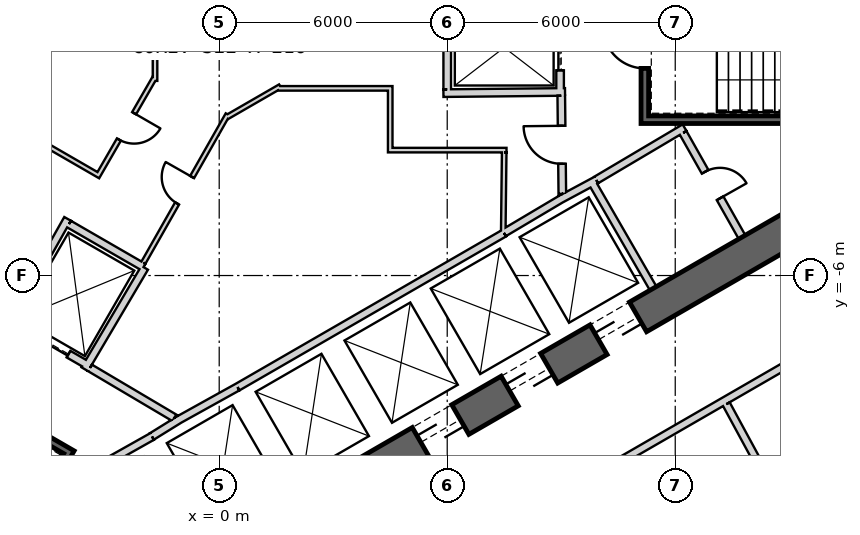
"""IFC4 building model, lengths in metres.
Left out: names, types, materials, properties, quantities, classifications, styles, units other than length and angle.
Written with IfcOpenShell. Run it as: python <this file> out.ifc"""

import sys

from ifc_helpers import new_model, si_unit, direction, frame, frame_2d, origin, place, context, subcontext, project, spatial, rectangle, extrude, element, fill, save


model = new_model("IFC4")
c1 = context("Model", 3, precision=1e-05, world=origin(), true_north=direction((0.0, 1.0)))
c2 = subcontext(c1, "Body", "Model", "MODEL_VIEW")
j1 = project(units=[si_unit("LENGTHUNIT", "METRE"), si_unit("PLANEANGLEUNIT", "RADIAN")], contexts=[c1])
p1 = place(None, origin())
s1 = spatial("IfcSite", under=j1, at=p1, CompositionType="ELEMENT")
p2 = place(p1, origin())
s2 = spatial("IfcBuilding", under=s1, at=p2, CompositionType="ELEMENT")
p3 = place(p2, frame((0.0, 0.0, 119.3)))
s3 = spatial("IfcBuildingStorey", under=s2, at=p3, CompositionType="ELEMENT", Elevation=119.3)
p4 = place(p3, frame((-7.825, -17.97, 0.0), z_axis=(0.0, 0.0, 1.0), x_axis=(0.866028369851, 0.499994862586, 0.0)))
e1 = element("IfcWall", 1, at=p4, inside=s3, PredefinedType="SHEAR", context=c2, shape_type="SweptSolid", body=[
    extrude(rectangle(XDim=31.523, YDim=0.9, at=frame_2d((15.762, 0.0))), origin(), (0.0, 0.0, 1.0), 4.1),
])
p5 = place(p4, frame((7.062, 0.0, 0.0)))
e2 = element("IfcOpeningElement", 2, at=p5, cuts=e1, PredefinedType="OPENING", context=c2, shape_type="SweptSolid", body=[
    extrude(rectangle(XDim=1.2, YDim=2.4, at=frame_2d((0.6, 1.2))), frame((0.0, 0.46, 0.0), z_axis=(0.0, -1.0, 0.0), x_axis=(1.0, 0.0, 0.0)), (0.0, 0.0, 1.0), 0.92),
])
p6 = place(p4, frame((9.762, 0.0, 0.0)))
e3 = element("IfcOpeningElement", 3, at=p6, cuts=e1, PredefinedType="OPENING", context=c2, shape_type="SweptSolid", body=[
    extrude(rectangle(XDim=1.2, YDim=2.4, at=frame_2d((0.6, 1.2))), frame((0.0, 0.46, 0.0), z_axis=(0.0, -1.0, 0.0), x_axis=(1.0, 0.0, 0.0)), (0.0, 0.0, 1.0), 0.92),
])
p7 = place(p4, frame((12.462, 0.0, 0.0)))
e4 = element("IfcOpeningElement", 4, at=p7, cuts=e1, PredefinedType="OPENING", context=c2, shape_type="SweptSolid", body=[
    extrude(rectangle(XDim=1.2, YDim=2.4, at=frame_2d((0.6, 1.2))), frame((0.0, 0.46, 0.0), z_axis=(0.0, -1.0, 0.0), x_axis=(1.0, 0.0, 0.0)), (0.0, 0.0, 1.0), 0.92),
])
p8 = place(p4, frame((15.162, 0.0, 0.0)))
e5 = element("IfcOpeningElement", 5, at=p8, cuts=e1, PredefinedType="OPENING", context=c2, shape_type="SweptSolid", body=[
    extrude(rectangle(XDim=1.2, YDim=2.4, at=frame_2d((0.6, 1.2))), frame((0.0, 0.46, 0.0), z_axis=(0.0, -1.0, 0.0), x_axis=(1.0, 0.0, 0.0)), (0.0, 0.0, 1.0), 0.92),
])
p9 = place(p4, frame((17.862, 0.0, 0.0)))
e6 = element("IfcOpeningElement", 6, at=p9, cuts=e1, PredefinedType="OPENING", context=c2, shape_type="SweptSolid", body=[
    extrude(rectangle(XDim=1.2, YDim=2.4, at=frame_2d((0.6, 1.2))), frame((0.0, 0.46, 0.0), z_axis=(0.0, -1.0, 0.0), x_axis=(1.0, 0.0, 0.0)), (0.0, 0.0, 1.0), 0.92),
])
p10 = place(p4, frame((20.562, 0.0, 0.0)))
e7 = element("IfcOpeningElement", 7, at=p10, cuts=e1, PredefinedType="OPENING", context=c2, shape_type="SweptSolid", body=[
    extrude(rectangle(XDim=1.2, YDim=2.4, at=frame_2d((0.6, 1.2))), frame((0.0, 0.46, 0.0), z_axis=(0.0, -1.0, 0.0), x_axis=(1.0, 0.0, 0.0)), (0.0, 0.0, 1.0), 0.92),
])
p11 = place(p4, frame((26.712, 0.0, 0.0)))
e8 = element("IfcOpeningElement", 8, at=p11, cuts=e1, PredefinedType="OPENING", context=c2, shape_type="SweptSolid", body=[
    extrude(rectangle(XDim=1.2, YDim=2.4, at=frame_2d((0.6, 1.2))), frame((0.0, 0.46, 0.0), z_axis=(0.0, -1.0, 0.0), x_axis=(1.0, 0.0, 0.0)), (0.0, 0.0, 1.0), 0.92),
])
p12 = place(p4, frame((3.612, 0.0, 0.0)))
e9 = element("IfcOpeningElement", 9, at=p12, cuts=e1, PredefinedType="OPENING", context=c2, shape_type="SweptSolid", body=[
    extrude(rectangle(XDim=1.2, YDim=2.4, at=frame_2d((0.6, 1.2))), frame((0.0, 0.46, 0.0), z_axis=(0.0, -1.0, 0.0), x_axis=(1.0, 0.0, 0.0)), (0.0, 0.0, 1.0), 0.92),
])
p13 = place(p3, frame((0.483, -8.936, 0.0), z_axis=(0.0, 0.0, 1.0), x_axis=(0.866030989016, 0.499990325971, 0.0)))
e10 = element("IfcWall", 10, at=p13, inside=s3, PredefinedType="PLUMBINGWALL", context=c2, shape_type="SweptSolid", body=[
    extrude(rectangle(XDim=8.1, YDim=0.2, at=frame_2d((4.05, 0.0))), origin(), (0.0, 0.0, 1.0), 3.8),
])
p14 = place(p3, frame((9.795, -3.525, 0.0), z_axis=(0.0, 0.0, 1.0), x_axis=(0.499984717929, -0.866034226713, 0.0)))
e11 = element("IfcWall", 11, at=p14, inside=s3, PredefinedType="PLUMBINGWALL", context=c2, shape_type="SweptSolid", body=[
    extrude(rectangle(XDim=3.25, YDim=0.2, at=frame_2d((1.625, 0.0))), origin(), (0.0, 0.0, 1.0), 3.8),
])
p15 = place(p3, frame((8.974, -3.999, 0.0), z_axis=(0.0, 0.0, 1.0), x_axis=(0.880907015104, 0.473289373154, 0.0)))
e12 = element("IfcWall", 12, at=p15, inside=s3, PredefinedType="PLUMBINGWALL", context=c2, shape_type="SweptSolid", body=[
    extrude(rectangle(XDim=1.078, YDim=0.2, at=frame_2d((0.539, 0.0))), origin(), (0.0, 0.0, 1.0), 3.8),
])
p16 = place(p3, frame((7.493, -4.878, 0.0), z_axis=(0.0, 0.0, 1.0), x_axis=(0.859981807212, 0.510324691999, 0.0)))
e13 = element("IfcWall", 13, at=p16, inside=s3, PredefinedType="PLUMBINGWALL", context=c2, shape_type="SweptSolid", body=[
    extrude(rectangle(XDim=1.845, YDim=0.2, at=frame_2d((0.922, 0.0))), origin(), (0.0, 0.0, 1.0), 3.8),
])
p17 = place(p3, frame((-1.769, -10.237, 0.0), z_axis=(0.0, 0.0, 1.0), x_axis=(-0.871534483978, -0.490334215854, 0.0)))
e14 = element("IfcWall", 14, at=p17, inside=s3, PredefinedType="PLUMBINGWALL", context=c2, shape_type="SweptSolid", body=[
    extrude(rectangle(XDim=2.7, YDim=0.2, at=frame_2d((1.35, 0.0))), origin(), (0.0, 0.0, 1.0), 3.8),
])
p18 = place(p3, frame((-1.024, -9.771, 0.0), z_axis=(0.0, 0.0, 1.0), x_axis=(-0.850348075135, -0.526220629693, 0.0)))
e15 = element("IfcWall", 15, at=p18, inside=s3, PredefinedType="PLUMBINGWALL", context=c2, shape_type="SweptSolid", body=[
    extrude(rectangle(XDim=0.878, YDim=0.2, at=frame_2d((0.439, 0.0))), origin(), (0.0, 0.0, 1.0), 3.8),
])
p19 = place(p3, frame((-1.13, -9.831, 0.0), z_axis=(0.0, 0.0, 1.0), x_axis=(0.874269620932, 0.485440655401, 0.0)))
e16 = element("IfcWall", 16, at=p19, inside=s3, PredefinedType="PLUMBINGWALL", context=c2, shape_type="SweptSolid", body=[
    extrude(rectangle(XDim=1.845, YDim=0.2, at=frame_2d((0.922, 0.0))), origin(), (0.0, 0.0, 1.0), 3.8),
])
p20 = place(p3, frame((11.1, -1.9, -0.3), z_axis=(0.0, 0.0, 1.0), x_axis=(1.0, 0.0, 0.0)))
e17 = element("IfcWall", 17, at=p20, inside=s3, PredefinedType="SHEAR", context=c2, shape_type="SweptSolid", body=[
    extrude(rectangle(XDim=7.9, YDim=0.2, at=frame_2d((3.95, 0.0))), origin(), (0.0, 0.0, 1.0), 4.1),
])
p21 = place(p3, frame((11.2, -1.8, -0.3), z_axis=(0.0, 0.0, 1.0), x_axis=(0.0, 1.0, 0.0)))
e18 = element("IfcWall", 18, at=p21, inside=s3, PredefinedType="SHEAR", context=c2, shape_type="SweptSolid", body=[
    extrude(rectangle(XDim=3.6, YDim=0.2, at=frame_2d((1.8, 0.0))), origin(), (0.0, 0.0, 1.0), 4.1),
])
p22 = place(p21, frame((1.25, 0.0, 0.3)))
e19 = element("IfcOpeningElement", 19, at=p22, cuts=e18, PredefinedType="OPENING", context=c2, shape_type="SweptSolid", body=[
    extrude(rectangle(XDim=1.1, YDim=2.1, at=frame_2d((0.55, 1.05))), frame((0.0, 0.11, 0.0), z_axis=(0.0, -1.0, 0.0), x_axis=(1.0, 0.0, 0.0)), (0.0, 0.0, 1.0), 0.22),
])
p23 = place(p3, frame((8.97, 1.2, 0.0), z_axis=(0.0, 0.0, 1.0), x_axis=(0.0, -1.0, 0.0)))
e20 = element("IfcWall", 20, at=p23, inside=s3, PredefinedType="PLUMBINGWALL", context=c2, shape_type="SweptSolid", body=[
    extrude(rectangle(XDim=2.4, YDim=0.2, at=frame_2d((1.2, 0.0))), origin(), (0.0, 0.0, 1.0), 3.8),
])
p24 = place(p23, frame((0.6, 0.0, 0.0)))
e21 = element("IfcOpeningElement", 21, at=p24, cuts=e20, PredefinedType="OPENING", context=c2, shape_type="SweptSolid", body=[
    extrude(rectangle(XDim=1.2, YDim=2.4, at=frame_2d((0.6, 1.2))), frame((0.0, 0.11, 0.0), z_axis=(0.0, -1.0, 0.0), x_axis=(1.0, 0.0, 0.0)), (0.0, 0.0, 1.0), 0.22),
])
p25 = place(p3, frame((5.9, -1.201, 0.0), z_axis=(0.0, 0.0, 1.0), x_axis=(0.999950064753, 0.009993397809, 0.0)))
e22 = element("IfcWall", 22, at=p25, inside=s3, PredefinedType="PLUMBINGWALL", context=c2, shape_type="SweptSolid", body=[
    extrude(rectangle(XDim=3.2, YDim=0.2, at=frame_2d((1.6, 0.0))), origin(), (0.0, 0.0, 1.0), 3.8),
])
p26 = place(p3, frame((6.0, -1.1, 0.0), z_axis=(0.0, 0.0, 1.0), x_axis=(0.0, 1.0, 0.0)))
e23 = element("IfcWall", 23, at=p26, inside=s3, PredefinedType="PLUMBINGWALL", context=c2, shape_type="SweptSolid", body=[
    extrude(rectangle(XDim=2.28, YDim=0.2, at=frame_2d((1.14, 0.0))), origin(), (0.0, 0.0, 1.0), 3.8),
])
p27 = place(p3, frame((-3.905, -10.563, -0.3), z_axis=(0.0, 0.0, 1.0), x_axis=(-0.500012932018, -0.866017937352, 0.0)))
e24 = element("IfcWall", 24, at=p27, inside=s3, PredefinedType="SHEAR", context=c2, shape_type="SweptSolid", body=[
    extrude(rectangle(XDim=8.1, YDim=0.2, at=frame_2d((4.05, 0.0))), origin(), (0.0, 0.0, 1.0), 4.1),
])
p28 = place(p3, frame((-4.041, -10.599, -0.3), z_axis=(0.0, 0.0, 1.0), x_axis=(-0.866047807691, 0.499961193289, 0.0)))
e25 = element("IfcWall", 25, at=p28, inside=s3, PredefinedType="SHEAR", context=c2, shape_type="SweptSolid", body=[
    extrude(rectangle(XDim=3.6, YDim=0.2, at=frame_2d((1.8, 0.0))), origin(), (0.0, 0.0, 1.0), 4.1),
])
p29 = place(p28, frame((1.25, 0.0, 0.3)))
e26 = element("IfcOpeningElement", 26, at=p29, cuts=e25, PredefinedType="OPENING", context=c2, shape_type="SweptSolid", body=[
    extrude(rectangle(XDim=1.1, YDim=2.1, at=frame_2d((0.55, 1.05))), frame((0.0, 0.11, 0.0), z_axis=(0.0, -1.0, 0.0), x_axis=(1.0, 0.0, 0.0)), (0.0, 0.0, 1.0), 0.22),
])
p30 = place(p3, frame((-3.446, -8.368, 0.0), z_axis=(0.0, 0.0, 1.0), x_axis=(-0.866024647952, 0.500001309137, 0.0)))
e27 = element("IfcWall", 27, at=p30, inside=s3, PredefinedType="PLUMBINGWALL", context=c2, shape_type="SweptSolid", body=[
    extrude(rectangle(XDim=2.4, YDim=0.2, at=frame_2d((1.2, 0.0))), origin(), (0.0, 0.0, 1.0), 3.8),
])
p31 = place(p30, frame((0.6, 0.0, 0.0)))
e28 = element("IfcOpeningElement", 28, at=p31, cuts=e27, PredefinedType="OPENING", context=c2, shape_type="SweptSolid", body=[
    extrude(rectangle(XDim=1.2, YDim=2.4, at=frame_2d((0.6, 1.2))), frame((0.0, 0.11, 0.0), z_axis=(0.0, -1.0, 0.0), x_axis=(1.0, 0.0, 0.0)), (0.0, 0.0, 1.0), 0.22),
])
p32 = place(p3, frame((-1.961, -5.796, 0.0), z_axis=(0.0, 0.0, 1.0), x_axis=(-0.508647062354, -0.860975125052, 0.0)))
e29 = element("IfcWall", 29, at=p32, inside=s3, PredefinedType="PLUMBINGWALL", context=c2, shape_type="SweptSolid", body=[
    extrude(rectangle(XDim=3.1, YDim=0.2, at=frame_2d((1.55, 0.0))), origin(), (0.0, 0.0, 1.0), 3.8),
])
p33 = place(p3, frame((-3.99, -4.509, 0.0), z_axis=(0.0, 0.0, 1.0), x_axis=(-0.491358283181, -0.870957540612, 0.0)))
e30 = element("IfcWall", 30, at=p33, inside=s3, PredefinedType="PLUMBINGWALL", context=c2, shape_type="SweptSolid", body=[
    extrude(rectangle(XDim=3.2, YDim=0.2, at=frame_2d((1.6, 0.0))), origin(), (0.0, 0.0, 1.0), 3.8),
])
p34 = place(p3, frame((-3.953, -4.646, 0.0), z_axis=(0.0, 0.0, 1.0), x_axis=(0.866065302921, -0.4999308863, 0.0)))
e31 = element("IfcWall", 31, at=p34, inside=s3, PredefinedType="PLUMBINGWALL", context=c2, shape_type="SweptSolid", body=[
    extrude(rectangle(XDim=2.264, YDim=0.2, at=frame_2d((1.132, 0.0))), origin(), (0.0, 0.0, 1.0), 3.8),
])
p35 = place(p3, frame((12.245, -2.109, 0.0), z_axis=(0.0, 0.0, 1.0), x_axis=(-0.860414880418, -0.509594185166, 0.0)))
e32 = element("IfcWall", 32, at=p35, inside=s3, PredefinedType="PARTITIONING", context=c2, shape_type="SweptSolid", body=[
    extrude(rectangle(XDim=2.7, YDim=0.2, at=frame_2d((1.35, 0.0))), origin(), (0.0, 0.0, 1.0), 3.8),
])
p36 = place(p3, frame((13.758, -4.99, 0.0), z_axis=(0.0, 0.0, 1.0), x_axis=(-0.491993409184, 0.87059892334, 0.0)))
e33 = element("IfcWall", 33, at=p36, inside=s3, PredefinedType="PARTITIONING", context=c2, shape_type="SweptSolid", body=[
    extrude(rectangle(XDim=3.15, YDim=0.2, at=frame_2d((1.575, 0.0))), origin(), (0.0, 0.0, 1.0), 3.8),
])
p37 = place(p36, frame((1.175, 0.0, 0.0)))
e34 = element("IfcOpeningElement", 34, at=p37, cuts=e33, PredefinedType="OPENING", context=c2, shape_type="SweptSolid", body=[
    extrude(rectangle(XDim=0.8, YDim=2.1, at=frame_2d((0.4, 1.05))), frame((0.0, 0.11, 0.0), z_axis=(0.0, -1.0, 0.0), x_axis=(1.0, 0.0, 0.0)), (0.0, 0.0, 1.0), 0.22),
])
p38 = place(p3, frame((9.029, -3.851, 0.0), z_axis=(0.0, 0.0, 1.0), x_axis=(-0.010783593937, 0.99994185536, 0.0)))
e35 = element("IfcWall", 35, at=p38, inside=s3, PredefinedType="PARTITIONING", context=c2, shape_type="SweptSolid", body=[
    extrude(rectangle(XDim=2.581, YDim=0.2, at=frame_2d((1.291, 0.0))), origin(), (0.0, 0.0, 1.0), 3.8),
])
p39 = place(p38, frame((0.791, 0.0, 0.0)))
e36 = element("IfcOpeningElement", 36, at=p39, cuts=e35, PredefinedType="OPENING", context=c2, shape_type="SweptSolid", body=[
    extrude(rectangle(XDim=1.0, YDim=2.1, at=frame_2d((0.5, 1.05))), frame((0.0, 0.11, 0.0), z_axis=(0.0, -1.0, 0.0), x_axis=(1.0, 0.0, 0.0)), (0.0, 0.0, 1.0), 0.22),
])
p40 = place(p3, frame((-3.401, -8.43, 0.0), z_axis=(0.0, 0.0, 1.0), x_axis=(0.860615607571, -0.509255118781, 0.0)))
e37 = element("IfcWall", 37, at=p40, inside=s3, PredefinedType="PARTITIONING", context=c2, shape_type="SweptSolid", body=[
    extrude(rectangle(XDim=2.581, YDim=0.2, at=frame_2d((1.29, 0.0))), origin(), (0.0, 0.0, 1.0), 3.8),
])
p41 = place(p3, frame((0.224, -1.761, 0.0), z_axis=(0.0, 0.0, 1.0), x_axis=(-0.494327216836, -0.869275907118, 0.0)))
e38 = element("IfcWall", 38, at=p41, inside=s3, PredefinedType="PARTITIONING", context=c2, shape_type="SweptSolid", body=[
    extrude(rectangle(XDim=4.487, YDim=0.12, at=frame_2d((2.244, 0.0))), origin(), (0.0, 0.0, 1.0), 3.8),
])
p42 = place(p41, frame((1.895, 0.0, 0.0)))
e39 = element("IfcOpeningElement", 39, at=p42, cuts=e38, PredefinedType="OPENING", context=c2, shape_type="SweptSolid", body=[
    extrude(rectangle(XDim=0.8, YDim=2.1, at=frame_2d((0.4, 1.05))), frame((0.0, 0.07, 0.0), z_axis=(0.0, -1.0, 0.0), x_axis=(1.0, 0.0, 0.0)), (0.0, 0.0, 1.0), 0.14),
])
p43 = place(p3, frame((1.605, -1.023, 0.0), z_axis=(0.0, 0.0, 1.0), x_axis=(-0.866001581989, -0.50004125829, 0.0)))
e40 = element("IfcWall", 40, at=p43, inside=s3, PredefinedType="PARTITIONING", context=c2, shape_type="SweptSolid", body=[
    extrude(rectangle(XDim=1.635, YDim=0.12, at=frame_2d((0.817, 0.0))), origin(), (0.0, 0.0, 1.0), 3.8),
])
p44 = place(p3, frame((4.56, -1.075, 0.0), z_axis=(0.0, 0.0, 1.0), x_axis=(-1.0, 0.0, 0.0)))
e41 = element("IfcWall", 41, at=p44, inside=s3, PredefinedType="PARTITIONING", context=c2, shape_type="SweptSolid", body=[
    extrude(rectangle(XDim=3.026, YDim=0.12, at=frame_2d((1.513, 0.0))), origin(), (0.0, 0.0, 1.0), 3.8),
])
p45 = place(p3, frame((4.5, -2.76, 0.0), z_axis=(0.0, 0.0, 1.0), x_axis=(0.0, 1.0, 0.0)))
e42 = element("IfcWall", 42, at=p45, inside=s3, PredefinedType="PARTITIONING", context=c2, shape_type="SweptSolid", body=[
    extrude(rectangle(XDim=1.625, YDim=0.12, at=frame_2d((0.812, 0.0))), origin(), (0.0, 0.0, 1.0), 3.8),
])
p46 = place(p3, frame((7.56, -2.7, 0.0), z_axis=(0.0, 0.0, 1.0), x_axis=(-1.0, 0.0, 0.0)))
e43 = element("IfcWall", 43, at=p46, inside=s3, PredefinedType="PARTITIONING", context=c2, shape_type="SweptSolid", body=[
    extrude(rectangle(XDim=3.0, YDim=0.12, at=frame_2d((1.5, 0.0))), origin(), (0.0, 0.0, 1.0), 3.8),
])
p47 = place(p3, frame((7.475, -4.865, 0.0), z_axis=(0.0, 0.0, 1.0), x_axis=(0.011716133148, 0.999931363757, 0.0)))
e44 = element("IfcWall", 44, at=p47, inside=s3, PredefinedType="PARTITIONING", context=c2, shape_type="SweptSolid", body=[
    extrude(rectangle(XDim=2.105, YDim=0.12, at=frame_2d((1.052, 0.0))), origin(), (0.0, 0.0, 1.0), 3.8),
])
p48 = place(p3, frame((-1.689, -0.879, 0.0), z_axis=(0.0, 0.0, 1.0), x_axis=(0.0, 1.0, 0.0)))
e45 = element("IfcWall", 45, at=p48, inside=s3, PredefinedType="PARTITIONING", context=c2, shape_type="SweptSolid", body=[
    extrude(rectangle(XDim=1.635, YDim=0.12, at=frame_2d((0.818, 0.0))), origin(), (0.0, 0.0, 1.0), 3.8),
])
p49 = place(p3, frame((-3.211, -3.412, 0.0), z_axis=(0.0, 0.0, 1.0), x_axis=(0.499983190554, 0.866035108505, 0.0)))
e46 = element("IfcWall", 46, at=p49, inside=s3, PredefinedType="PARTITIONING", context=c2, shape_type="SweptSolid", body=[
    extrude(rectangle(XDim=3.026, YDim=0.12, at=frame_2d((1.513, 0.0))), origin(), (0.0, 0.0, 1.0), 3.8),
])
p50 = place(p49, frame((1.143, 0.0, 0.0)))
e47 = element("IfcOpeningElement", 47, at=p50, cuts=e46, PredefinedType="OPENING", context=c2, shape_type="SweptSolid", body=[
    extrude(rectangle(XDim=0.8, YDim=2.1, at=frame_2d((0.4, 1.05))), frame((0.0, 0.07, 0.0), z_axis=(0.0, -1.0, 0.0), x_axis=(1.0, 0.0, 0.0)), (0.0, 0.0, 1.0), 0.14),
])
p51 = place(p3, frame((-4.64, -2.517, 0.0), z_axis=(0.0, 0.0, 1.0), x_axis=(0.866015446554, -0.500017246033, 0.0)))
e48 = element("IfcWall", 48, at=p51, inside=s3, PredefinedType="PARTITIONING", context=c2, shape_type="SweptSolid", body=[
    extrude(rectangle(XDim=1.625, YDim=0.12, at=frame_2d((0.812, 0.0))), origin(), (0.0, 0.0, 1.0), 3.8),
])
p52 = place(p3, frame((-6.852, -20.93, 0.0), z_axis=(0.0, 0.0, 1.0), x_axis=(0.866023703603, 0.500002944789, 0.0)))
e49 = element("IfcWall", 49, at=p52, inside=s3, PredefinedType="PARTITIONING", context=c2, shape_type="SweptSolid", body=[
    extrude(rectangle(XDim=32.599, YDim=0.2, at=frame_2d((16.299, 0.0))), origin(), (0.0, 0.0, 1.0), 2.98),
])
p53 = place(p52, frame((27.463, 0.0, 0.0)))
e50 = element("IfcOpeningElement", 50, at=p53, cuts=e49, PredefinedType="OPENING", context=c2, shape_type="SweptSolid", body=[
    extrude(rectangle(XDim=1.0, YDim=2.1, at=frame_2d((0.5, 1.05))), frame((0.0, 0.11, 0.0), z_axis=(0.0, -1.0, 0.0), x_axis=(1.0, 0.0, 0.0)), (0.0, 0.0, 1.0), 0.22),
])
p54 = place(p52, frame((16.307, 0.0, 0.0)))
e51 = element("IfcOpeningElement", 51, at=p54, cuts=e49, PredefinedType="OPENING", context=c2, shape_type="SweptSolid", body=[
    extrude(rectangle(XDim=1.0, YDim=2.1, at=frame_2d((0.5, 1.05))), frame((0.0, 0.11, 0.0), z_axis=(0.0, -1.0, 0.0), x_axis=(1.0, 0.0, 0.0)), (0.0, 0.0, 1.0), 0.22),
])
p55 = place(p52, frame((4.694, 0.0, 0.0)))
e52 = element("IfcOpeningElement", 52, at=p55, cuts=e49, PredefinedType="OPENING", context=c2, shape_type="SweptSolid", body=[
    extrude(rectangle(XDim=1.0, YDim=2.1, at=frame_2d((0.5, 1.05))), frame((0.0, 0.11, 0.0), z_axis=(0.0, -1.0, 0.0), x_axis=(1.0, 0.0, 0.0)), (0.0, 0.0, 1.0), 0.22),
])
p56 = place(p3, frame((13.345, -9.385, 0.0), z_axis=(0.0, 0.0, 1.0), x_axis=(0.477273420177, -0.878754847721, 0.0)))
e53 = element("IfcWall", 53, at=p56, inside=s3, PredefinedType="PARTITIONING", context=c2, shape_type="SweptSolid", body=[
    extrude(rectangle(XDim=13.442, YDim=0.2, at=frame_2d((6.721, 0.0))), origin(), (0.0, 0.0, 1.0), 3.08),
])
p57 = place(p22, origin())
e54 = element("IfcDoor", 54, at=p57, inside=s3, OperationType="SINGLE_SWING_RIGHT", PredefinedType="USERDEFINED", context=c2, shape_type="SweptSolid", body=[
    extrude(rectangle(XDim=1.1, YDim=2.1, at=frame_2d((0.55, 1.05))), frame((0.0, 0.025, 0.0), z_axis=(0.0, -1.0, 0.0), x_axis=(1.0, 0.0, 0.0)), (0.0, 0.0, 1.0), 0.05),
])
fill(e19, e54)
p58 = place(p39, origin())
e55 = element("IfcDoor", 55, at=p58, inside=s3, OperationType="SINGLE_SWING_RIGHT", PredefinedType="USERDEFINED", context=c2, shape_type="SweptSolid", body=[
    extrude(rectangle(XDim=1.0, YDim=2.1, at=frame_2d((0.5, 1.05))), frame((0.0, 0.025, 0.0), z_axis=(0.0, -1.0, 0.0), x_axis=(1.0, 0.0, 0.0)), (0.0, 0.0, 1.0), 0.05),
])
fill(e36, e55)
p59 = place(p24, origin())
e56 = element("IfcDoor", 56, at=p59, inside=s3, OperationType="SLIDING_TO_LEFT", PredefinedType="USERDEFINED", context=c2, shape_type="SweptSolid", body=[
    extrude(rectangle(XDim=1.2, YDim=2.4, at=frame_2d((0.6, 1.2))), frame((0.0, 0.025, 0.0), z_axis=(0.0, -1.0, 0.0), x_axis=(1.0, 0.0, 0.0)), (0.0, 0.0, 1.0), 0.05),
])
fill(e21, e56)
p60 = place(p31, origin())
e57 = element("IfcDoor", 57, at=p60, inside=s3, OperationType="SLIDING_TO_LEFT", PredefinedType="USERDEFINED", context=c2, shape_type="SweptSolid", body=[
    extrude(rectangle(XDim=1.2, YDim=2.4, at=frame_2d((0.6, 1.2))), frame((0.0, 0.025, 0.0), z_axis=(0.0, -1.0, 0.0), x_axis=(1.0, 0.0, 0.0)), (0.0, 0.0, 1.0), 0.05),
])
fill(e28, e57)
p61 = place(p42, origin())
e58 = element("IfcDoor", 58, at=p61, inside=s3, OperationType="SINGLE_SWING_LEFT", PredefinedType="USERDEFINED", context=c2, shape_type="SweptSolid", body=[
    extrude(rectangle(XDim=0.8, YDim=2.1, at=frame_2d((0.4, 1.05))), frame((0.0, 0.025, 0.0), z_axis=(0.0, -1.0, 0.0), x_axis=(1.0, 0.0, 0.0)), (0.0, 0.0, 1.0), 0.05),
])
fill(e39, e58)
p62 = place(p50, origin())
e59 = element("IfcDoor", 59, at=p62, inside=s3, OperationType="SINGLE_SWING_LEFT", PredefinedType="USERDEFINED", context=c2, shape_type="SweptSolid", body=[
    extrude(rectangle(XDim=0.8, YDim=2.1, at=frame_2d((0.4, 1.05))), frame((0.0, 0.025, 0.0), z_axis=(0.0, -1.0, 0.0), x_axis=(1.0, 0.0, 0.0)), (0.0, 0.0, 1.0), 0.05),
])
fill(e47, e59)
p63 = place(p37, origin())
e60 = element("IfcDoor", 60, at=p63, inside=s3, OperationType="SINGLE_SWING_LEFT", PredefinedType="USERDEFINED", context=c2, shape_type="SweptSolid", body=[
    extrude(rectangle(XDim=0.8, YDim=2.1, at=frame_2d((0.4, 1.05))), frame((0.0, 0.025, 0.0), z_axis=(0.0, -1.0, 0.0), x_axis=(1.0, 0.0, 0.0)), (0.0, 0.0, 1.0), 0.05),
])
fill(e34, e60)
p64 = place(p8, origin())
e61 = element("IfcDoor", 61, at=p64, inside=s3, OperationType="SLIDING_TO_LEFT", PredefinedType="USERDEFINED", context=c2, shape_type="SweptSolid", body=[
    extrude(rectangle(XDim=1.2, YDim=2.4, at=frame_2d((0.6, 1.2))), frame((0.0, 0.025, 0.0), z_axis=(0.0, -1.0, 0.0), x_axis=(1.0, 0.0, 0.0)), (0.0, 0.0, 1.0), 0.05),
])
fill(e5, e61)
p65 = place(p9, origin())
e62 = element("IfcDoor", 62, at=p65, inside=s3, OperationType="SLIDING_TO_LEFT", PredefinedType="USERDEFINED", context=c2, shape_type="SweptSolid", body=[
    extrude(rectangle(XDim=1.2, YDim=2.4, at=frame_2d((0.6, 1.2))), frame((0.0, 0.025, 0.0), z_axis=(0.0, -1.0, 0.0), x_axis=(1.0, 0.0, 0.0)), (0.0, 0.0, 1.0), 0.05),
])
fill(e6, e62)
p66 = place(p10, origin())
e63 = element("IfcDoor", 63, at=p66, inside=s3, OperationType="SLIDING_TO_LEFT", PredefinedType="USERDEFINED", context=c2, shape_type="SweptSolid", body=[
    extrude(rectangle(XDim=1.2, YDim=2.4, at=frame_2d((0.6, 1.2))), frame((0.0, 0.025, 0.0), z_axis=(0.0, -1.0, 0.0), x_axis=(1.0, 0.0, 0.0)), (0.0, 0.0, 1.0), 0.05),
])
fill(e7, e63)
save(model, sys.argv[1])
